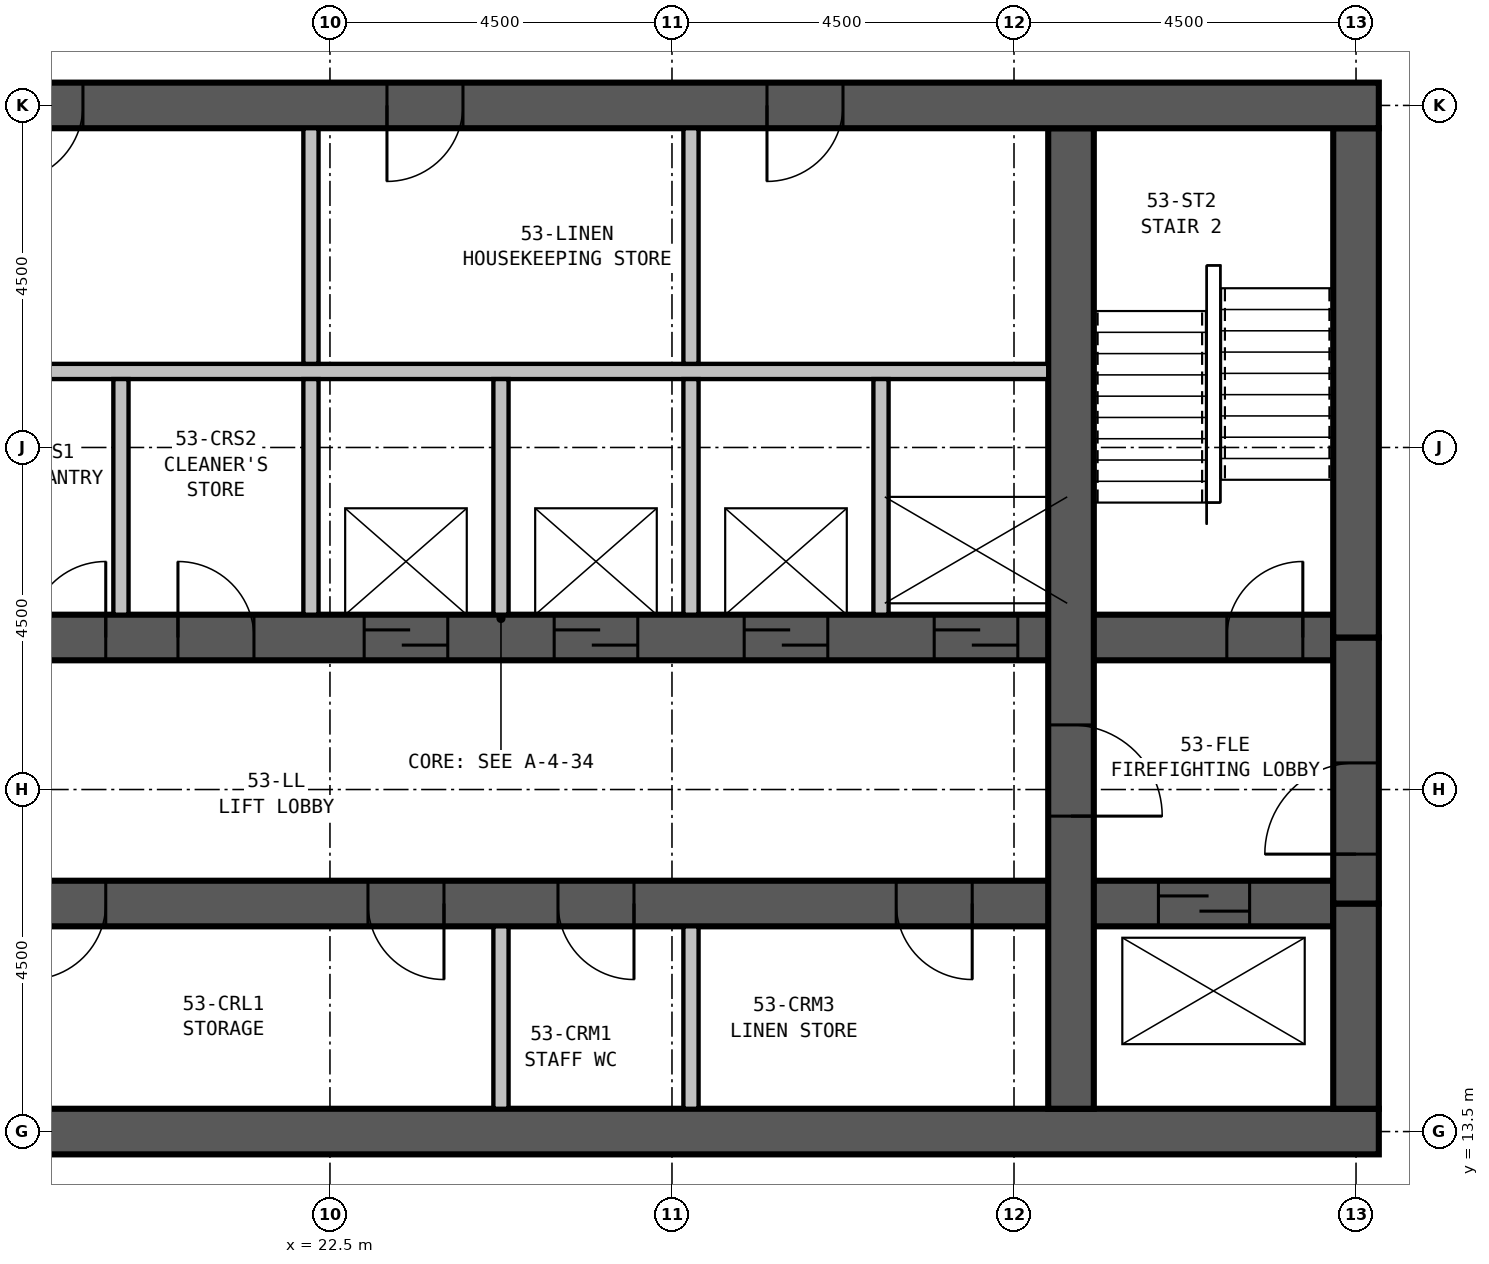
"""IFC4 building model, lengths in metres.
Left out: names, types, materials, properties, quantities, classifications, styles, units other than length and angle.
Written with IfcOpenShell. Run it as: python <this file> out.ifc"""

import sys

from ifc_helpers import new_model, si_unit, direction, frame, frame_2d, origin, place, context, subcontext, project, spatial, rectangle, extrude, element, fill, save


model = new_model("IFC4")
c1 = context("Model", 3, precision=1e-05, world=origin(), true_north=direction((0.0, 1.0)))
c2 = subcontext(c1, "Body", "Model", "MODEL_VIEW")
j1 = project(units=[si_unit("LENGTHUNIT", "METRE"), si_unit("PLANEANGLEUNIT", "RADIAN")], contexts=[c1])
p1 = place(None, origin())
s1 = spatial("IfcSite", under=j1, at=p1, CompositionType="ELEMENT")
p2 = place(p1, origin())
s2 = spatial("IfcBuilding", under=s1, at=p2, CompositionType="ELEMENT")
p3 = place(p2, frame((0.0, 0.0, 204.4)))
s3 = spatial("IfcBuildingStorey", under=s2, at=p3, CompositionType="ELEMENT", Elevation=204.4)
p4 = place(p3, frame((13.2, 13.5, 0.0), z_axis=(0.0, 0.0, 1.0), x_axis=(1.0, 0.0, 0.0)))
e1 = element("IfcWall", 1, at=p4, inside=s3, PredefinedType="SHEAR", context=c2, shape_type="SweptSolid", body=[
    extrude(rectangle(XDim=23.1, YDim=0.6, at=frame_2d((11.55, 0.0))), origin(), (0.0, 0.0, 1.0), 3.5),
])
p5 = place(p3, frame((36.3, 27.0, 0.0), z_axis=(0.0, 0.0, 1.0), x_axis=(-1.0, 0.0, 0.0)))
e2 = element("IfcWall", 2, at=p5, inside=s3, PredefinedType="SHEAR", context=c2, shape_type="SweptSolid", body=[
    extrude(rectangle(XDim=23.1, YDim=0.6, at=frame_2d((11.55, 0.0))), origin(), (0.0, 0.0, 1.0), 3.5),
])
p6 = place(p5, frame((17.05, 0.0, 0.0)))
e3 = element("IfcOpeningElement", 3, at=p6, cuts=e2, PredefinedType="OPENING", context=c2, shape_type="SweptSolid", body=[
    extrude(rectangle(XDim=1.0, YDim=2.1, at=frame_2d((0.5, 1.05))), frame((0.0, 0.31, 0.0), z_axis=(0.0, -1.0, 0.0), x_axis=(1.0, 0.0, 0.0)), (0.0, 0.0, 1.0), 0.62),
])
p7 = place(p5, frame((12.05, 0.0, 0.0)))
e4 = element("IfcOpeningElement", 4, at=p7, cuts=e2, PredefinedType="OPENING", context=c2, shape_type="SweptSolid", body=[
    extrude(rectangle(XDim=1.0, YDim=2.1, at=frame_2d((0.5, 1.05))), frame((0.0, 0.31, 0.0), z_axis=(0.0, -1.0, 0.0), x_axis=(1.0, 0.0, 0.0)), (0.0, 0.0, 1.0), 0.62),
])
p8 = place(p5, frame((7.05, 0.0, 0.0)))
e5 = element("IfcOpeningElement", 5, at=p8, cuts=e2, PredefinedType="OPENING", context=c2, shape_type="SweptSolid", body=[
    extrude(rectangle(XDim=1.0, YDim=2.1, at=frame_2d((0.5, 1.05))), frame((0.0, 0.31, 0.0), z_axis=(0.0, -1.0, 0.0), x_axis=(1.0, 0.0, 0.0)), (0.0, 0.0, 1.0), 0.62),
])
p9 = place(p3, frame((32.25, 13.8, 0.0), z_axis=(0.0, 0.0, 1.0), x_axis=(0.0, 1.0, 0.0)))
e6 = element("IfcWall", 6, at=p9, inside=s3, PredefinedType="SHEAR", context=c2, shape_type="SweptSolid", body=[
    extrude(rectangle(XDim=12.9, YDim=0.6, at=frame_2d((6.45, 0.0))), origin(), (0.0, 0.0, 1.0), 3.5),
])
p10 = place(p9, frame((5.05, 0.0, 0.0), z_axis=(0.0, 0.0, 1.0), x_axis=(-1.0, 0.0, 0.0)))
e7 = element("IfcOpeningElement", 7, at=p10, cuts=e6, PredefinedType="OPENING", context=c2, shape_type="SweptSolid", body=[
    extrude(rectangle(XDim=1.2, YDim=2.1, at=frame_2d((0.6, 1.05))), frame((0.0, 0.31, 0.0), z_axis=(0.0, -1.0, 0.0), x_axis=(1.0, 0.0, 0.0)), (0.0, 0.0, 1.0), 0.62),
])
p11 = place(p3, frame((13.8, 16.5, 0.0), z_axis=(0.0, 0.0, 1.0), x_axis=(1.0, 0.0, 0.0)))
e8 = element("IfcWall", 8, at=p11, inside=s3, PredefinedType="SHEAR", context=c2, shape_type="SweptSolid", body=[
    extrude(rectangle(XDim=21.9, YDim=0.6, at=frame_2d((10.95, 0.0))), origin(), (0.0, 0.0, 1.0), 3.5),
])
p12 = place(p11, frame((5.75, 0.0, 0.0), z_axis=(0.0, 0.0, 1.0), x_axis=(-1.0, 0.0, 0.0)))
e9 = element("IfcOpeningElement", 9, at=p12, cuts=e8, PredefinedType="OPENING", context=c2, shape_type="SweptSolid", body=[
    extrude(rectangle(XDim=1.0, YDim=2.1, at=frame_2d((0.5, 1.05))), frame((0.0, 0.31, 0.0), z_axis=(0.0, -1.0, 0.0), x_axis=(1.0, 0.0, 0.0)), (0.0, 0.0, 1.0), 0.62),
])
p13 = place(p11, frame((10.2, 0.0, 0.0), z_axis=(0.0, 0.0, 1.0), x_axis=(-1.0, 0.0, 0.0)))
e10 = element("IfcOpeningElement", 10, at=p13, cuts=e8, PredefinedType="OPENING", context=c2, shape_type="SweptSolid", body=[
    extrude(rectangle(XDim=1.0, YDim=2.1, at=frame_2d((0.5, 1.05))), frame((0.0, 0.31, 0.0), z_axis=(0.0, -1.0, 0.0), x_axis=(1.0, 0.0, 0.0)), (0.0, 0.0, 1.0), 0.62),
])
p14 = place(p11, frame((12.7, 0.0, 0.0), z_axis=(0.0, 0.0, 1.0), x_axis=(-1.0, 0.0, 0.0)))
e11 = element("IfcOpeningElement", 11, at=p14, cuts=e8, PredefinedType="OPENING", context=c2, shape_type="SweptSolid", body=[
    extrude(rectangle(XDim=1.0, YDim=2.1, at=frame_2d((0.5, 1.05))), frame((0.0, 0.31, 0.0), z_axis=(0.0, -1.0, 0.0), x_axis=(1.0, 0.0, 0.0)), (0.0, 0.0, 1.0), 0.62),
])
p15 = place(p11, frame((17.15, 0.0, 0.0), z_axis=(0.0, 0.0, 1.0), x_axis=(-1.0, 0.0, 0.0)))
e12 = element("IfcOpeningElement", 12, at=p15, cuts=e8, PredefinedType="OPENING", context=c2, shape_type="SweptSolid", body=[
    extrude(rectangle(XDim=1.0, YDim=2.1, at=frame_2d((0.5, 1.05))), frame((0.0, 0.31, 0.0), z_axis=(0.0, -1.0, 0.0), x_axis=(1.0, 0.0, 0.0)), (0.0, 0.0, 1.0), 0.62),
])
p16 = place(p11, frame((0.6, 0.0, 0.0)))
e13 = element("IfcOpeningElement", 13, at=p16, cuts=e8, PredefinedType="OPENING", context=c2, shape_type="SweptSolid", body=[
    extrude(rectangle(XDim=1.2, YDim=2.1, at=frame_2d((0.6, 1.05))), frame((0.0, 0.31, 0.0), z_axis=(0.0, -1.0, 0.0), x_axis=(1.0, 0.0, 0.0)), (0.0, 0.0, 1.0), 0.62),
])
p17 = place(p11, frame((19.6, 0.0, 0.0)))
e14 = element("IfcOpeningElement", 14, at=p17, cuts=e8, PredefinedType="OPENING", context=c2, shape_type="SweptSolid", body=[
    extrude(rectangle(XDim=1.2, YDim=2.1, at=frame_2d((0.6, 1.05))), frame((0.0, 0.31, 0.0), z_axis=(0.0, -1.0, 0.0), x_axis=(1.0, 0.0, 0.0)), (0.0, 0.0, 1.0), 0.62),
])
p18 = place(p3, frame((13.8, 20.0, 0.0), z_axis=(0.0, 0.0, 1.0), x_axis=(1.0, 0.0, 0.0)))
e15 = element("IfcWall", 15, at=p18, inside=s3, PredefinedType="SHEAR", context=c2, shape_type="SweptSolid", body=[
    extrude(rectangle(XDim=21.9, YDim=0.6, at=frame_2d((10.95, 0.0))), origin(), (0.0, 0.0, 1.0), 3.5),
])
p19 = place(p18, frame((0.5, 0.0, 0.0)))
e16 = element("IfcOpeningElement", 16, at=p19, cuts=e15, PredefinedType="OPENING", context=c2, shape_type="SweptSolid", body=[
    extrude(rectangle(XDim=1.0, YDim=2.1, at=frame_2d((0.5, 1.05))), frame((0.0, 0.31, 0.0), z_axis=(0.0, -1.0, 0.0), x_axis=(1.0, 0.0, 0.0)), (0.0, 0.0, 1.0), 0.62),
])
p20 = place(p18, frame((20.5, 0.0, 0.0)))
e17 = element("IfcOpeningElement", 17, at=p20, cuts=e15, PredefinedType="OPENING", context=c2, shape_type="SweptSolid", body=[
    extrude(rectangle(XDim=1.0, YDim=2.1, at=frame_2d((0.5, 1.05))), frame((0.0, 0.31, 0.0), z_axis=(0.0, -1.0, 0.0), x_axis=(1.0, 0.0, 0.0)), (0.0, 0.0, 1.0), 0.62),
])
p21 = place(p18, frame((9.15, 0.0, 0.0)))
e18 = element("IfcOpeningElement", 18, at=p21, cuts=e15, PredefinedType="OPENING", context=c2, shape_type="SweptSolid", body=[
    extrude(rectangle(XDim=1.1, YDim=2.1, at=frame_2d((0.55, 1.05))), frame((0.0, 0.31, 0.0), z_axis=(0.0, -1.0, 0.0), x_axis=(1.0, 0.0, 0.0)), (0.0, 0.0, 1.0), 0.62),
])
p22 = place(p18, frame((11.65, 0.0, 0.0)))
e19 = element("IfcOpeningElement", 19, at=p22, cuts=e15, PredefinedType="OPENING", context=c2, shape_type="SweptSolid", body=[
    extrude(rectangle(XDim=1.1, YDim=2.1, at=frame_2d((0.55, 1.05))), frame((0.0, 0.31, 0.0), z_axis=(0.0, -1.0, 0.0), x_axis=(1.0, 0.0, 0.0)), (0.0, 0.0, 1.0), 0.62),
])
p23 = place(p18, frame((14.15, 0.0, 0.0)))
e20 = element("IfcOpeningElement", 20, at=p23, cuts=e15, PredefinedType="OPENING", context=c2, shape_type="SweptSolid", body=[
    extrude(rectangle(XDim=1.1, YDim=2.1, at=frame_2d((0.55, 1.05))), frame((0.0, 0.31, 0.0), z_axis=(0.0, -1.0, 0.0), x_axis=(1.0, 0.0, 0.0)), (0.0, 0.0, 1.0), 0.62),
])
p24 = place(p18, frame((16.65, 0.0, 0.0)))
e21 = element("IfcOpeningElement", 21, at=p24, cuts=e15, PredefinedType="OPENING", context=c2, shape_type="SweptSolid", body=[
    extrude(rectangle(XDim=1.1, YDim=2.1, at=frame_2d((0.55, 1.05))), frame((0.0, 0.31, 0.0), z_axis=(0.0, -1.0, 0.0), x_axis=(1.0, 0.0, 0.0)), (0.0, 0.0, 1.0), 0.62),
])
p25 = place(p18, frame((4.75, 0.0, 0.0)))
e22 = element("IfcOpeningElement", 22, at=p25, cuts=e15, PredefinedType="OPENING", context=c2, shape_type="SweptSolid", body=[
    extrude(rectangle(XDim=1.0, YDim=2.1, at=frame_2d((0.5, 1.05))), frame((0.0, 0.31, 0.0), z_axis=(0.0, -1.0, 0.0), x_axis=(1.0, 0.0, 0.0)), (0.0, 0.0, 1.0), 0.62),
])
p26 = place(p18, frame((6.7, 0.0, 0.0)))
e23 = element("IfcOpeningElement", 23, at=p26, cuts=e15, PredefinedType="OPENING", context=c2, shape_type="SweptSolid", body=[
    extrude(rectangle(XDim=1.0, YDim=2.1, at=frame_2d((0.5, 1.05))), frame((0.0, 0.31, 0.0), z_axis=(0.0, -1.0, 0.0), x_axis=(1.0, 0.0, 0.0)), (0.0, 0.0, 1.0), 0.62),
])
p27 = place(p3, frame((36.0, 13.8, 0.0), z_axis=(0.0, 0.0, 1.0), x_axis=(0.0, 1.0, 0.0)))
e24 = element("IfcWall", 24, at=p27, inside=s3, PredefinedType="SHEAR", context=c2, shape_type="SweptSolid", body=[
    extrude(rectangle(XDim=2.7, YDim=0.6, at=frame_2d((1.35, 0.0))), origin(), (0.0, 0.0, 1.0), 3.5),
])
p28 = place(p3, frame((36.0, 16.5, 0.0), z_axis=(0.0, 0.0, 1.0), x_axis=(0.0, 1.0, 0.0)))
e25 = element("IfcWall", 25, at=p28, inside=s3, PredefinedType="SHEAR", context=c2, shape_type="SweptSolid", body=[
    extrude(rectangle(XDim=3.5, YDim=0.6, at=frame_2d((1.75, 0.0))), origin(), (0.0, 0.0, 1.0), 3.5),
])
p29 = place(p28, frame((0.65, 0.0, 0.0)))
e26 = element("IfcOpeningElement", 26, at=p29, cuts=e25, PredefinedType="OPENING", context=c2, shape_type="SweptSolid", body=[
    extrude(rectangle(XDim=1.2, YDim=2.1, at=frame_2d((0.6, 1.05))), frame((0.0, 0.31, 0.0), z_axis=(0.0, -1.0, 0.0), x_axis=(1.0, 0.0, 0.0)), (0.0, 0.0, 1.0), 0.62),
])
p30 = place(p3, frame((36.0, 20.0, 0.0), z_axis=(0.0, 0.0, 1.0), x_axis=(0.0, 1.0, 0.0)))
e27 = element("IfcWall", 27, at=p30, inside=s3, PredefinedType="SHEAR", context=c2, shape_type="SweptSolid", body=[
    extrude(rectangle(XDim=6.7, YDim=0.6, at=frame_2d((3.35, 0.0))), origin(), (0.0, 0.0, 1.0), 3.5),
])
for number, where, z_axis, x_axis in (
    (28, (19.75, 20.3, 0.0), (0.0, 0.0, 1.0), (0.0, 1.0, 0.0)),
    (29, (22.25, 20.3, 0.0), (0.0, 0.0, 1.0), (0.0, 1.0, 0.0)),
):
    element("IfcWall", number, at=place(p3, frame(where, z_axis=z_axis, x_axis=x_axis)), inside=s3, PredefinedType="PARTITIONING", context=c2, shape_type="SweptSolid", body=[
        extrude(rectangle(XDim=3.1, YDim=0.2, at=frame_2d((1.55, 0.0))), origin(), (0.0, 0.0, 1.0), 3.25),
    ])
p31 = place(p3, frame((24.75, 13.8, 0.0), z_axis=(0.0, 0.0, 1.0), x_axis=(0.0, 1.0, 0.0)))
e30 = element("IfcWall", 30, at=p31, inside=s3, PredefinedType="PARTITIONING", context=c2, shape_type="SweptSolid", body=[
    extrude(rectangle(XDim=2.4, YDim=0.2, at=frame_2d((1.2, 0.0))), origin(), (0.0, 0.0, 1.0), 3.25),
])
p32 = place(p3, frame((24.75, 20.3, 0.0), z_axis=(0.0, 0.0, 1.0), x_axis=(0.0, 1.0, 0.0)))
e31 = element("IfcWall", 31, at=p32, inside=s3, PredefinedType="PARTITIONING", context=c2, shape_type="SweptSolid", body=[
    extrude(rectangle(XDim=3.1, YDim=0.2, at=frame_2d((1.55, 0.0))), origin(), (0.0, 0.0, 1.0), 3.25),
])
p33 = place(p3, frame((27.25, 13.8, 0.0), z_axis=(0.0, 0.0, 1.0), x_axis=(0.0, 1.0, 0.0)))
e32 = element("IfcWall", 32, at=p33, inside=s3, PredefinedType="PARTITIONING", context=c2, shape_type="SweptSolid", body=[
    extrude(rectangle(XDim=2.4, YDim=0.2, at=frame_2d((1.2, 0.0))), origin(), (0.0, 0.0, 1.0), 3.25),
])
for number, where, z_axis, x_axis in (
    (33, (27.25, 20.3, 0.0), (0.0, 0.0, 1.0), (0.0, 1.0, 0.0)),
    (34, (29.75, 20.3, 0.0), (0.0, 0.0, 1.0), (0.0, 1.0, 0.0)),
):
    element("IfcWall", number, at=place(p3, frame(where, z_axis=z_axis, x_axis=x_axis)), inside=s3, PredefinedType="PARTITIONING", context=c2, shape_type="SweptSolid", body=[
        extrude(rectangle(XDim=3.1, YDim=0.2, at=frame_2d((1.55, 0.0))), origin(), (0.0, 0.0, 1.0), 3.25),
    ])
p34 = place(p3, frame((17.55, 23.5, 0.0), z_axis=(0.0, 0.0, 1.0), x_axis=(1.0, 0.0, 0.0)))
e35 = element("IfcWall", 35, at=p34, inside=s3, PredefinedType="PARTITIONING", context=c2, shape_type="SweptSolid", body=[
    extrude(rectangle(XDim=14.4, YDim=0.2, at=frame_2d((7.2, 0.0))), origin(), (0.0, 0.0, 1.0), 3.25),
])
for number, where, z_axis, x_axis in (
    (36, (22.25, 23.6, 0.0), (0.0, 0.0, 1.0), (0.0, 1.0, 0.0)),
    (37, (27.25, 23.6, 0.0), (0.0, 0.0, 1.0), (0.0, 1.0, 0.0)),
):
    element("IfcWall", number, at=place(p3, frame(where, z_axis=z_axis, x_axis=x_axis)), inside=s3, PredefinedType="PARTITIONING", context=c2, shape_type="SweptSolid", body=[
        extrude(rectangle(XDim=3.1, YDim=0.2, at=frame_2d((1.55, 0.0))), origin(), (0.0, 0.0, 1.0), 3.25),
    ])
p35 = place(p29, origin())
e38 = element("IfcDoor", 38, at=p35, inside=s3, OperationType="SINGLE_SWING_LEFT", PredefinedType="DOOR", context=c2, shape_type="SweptSolid", body=[
    extrude(rectangle(XDim=1.2, YDim=2.1, at=frame_2d((0.6, 1.05))), frame((0.0, 0.3, 0.0), z_axis=(0.0, -1.0, 0.0), x_axis=(1.0, 0.0, 0.0)), (0.0, 0.0, 1.0), 0.6),
])
fill(e26, e38)
p36 = place(p10, origin())
e39 = element("IfcDoor", 39, at=p36, inside=s3, OperationType="SINGLE_SWING_RIGHT", PredefinedType="DOOR", context=c2, shape_type="SweptSolid", body=[
    extrude(rectangle(XDim=1.2, YDim=2.1, at=frame_2d((0.6, 1.05))), frame((0.0, 0.3, 0.0), z_axis=(0.0, -1.0, 0.0), x_axis=(1.0, 0.0, 0.0)), (0.0, 0.0, 1.0), 0.6),
])
fill(e7, e39)
p37 = place(p20, origin())
e40 = element("IfcDoor", 40, at=p37, inside=s3, OperationType="SINGLE_SWING_RIGHT", PredefinedType="DOOR", context=c2, shape_type="SweptSolid", body=[
    extrude(rectangle(XDim=1.0, YDim=2.1, at=frame_2d((0.5, 1.05))), frame((0.0, 0.3, 0.0), z_axis=(0.0, -1.0, 0.0), x_axis=(1.0, 0.0, 0.0)), (0.0, 0.0, 1.0), 0.6),
])
fill(e17, e40)
p38 = place(p21, origin())
e41 = element("IfcDoor", 41, at=p38, inside=s3, OperationType="SLIDING_TO_LEFT", PredefinedType="DOOR", context=c2, shape_type="SweptSolid", body=[
    extrude(rectangle(XDim=1.1, YDim=2.1, at=frame_2d((0.55, 1.05))), frame((0.0, 0.3, 0.0), z_axis=(0.0, -1.0, 0.0), x_axis=(1.0, 0.0, 0.0)), (0.0, 0.0, 1.0), 0.6),
])
fill(e18, e41)
p39 = place(p22, origin())
e42 = element("IfcDoor", 42, at=p39, inside=s3, OperationType="SLIDING_TO_LEFT", PredefinedType="DOOR", context=c2, shape_type="SweptSolid", body=[
    extrude(rectangle(XDim=1.1, YDim=2.1, at=frame_2d((0.55, 1.05))), frame((0.0, 0.3, 0.0), z_axis=(0.0, -1.0, 0.0), x_axis=(1.0, 0.0, 0.0)), (0.0, 0.0, 1.0), 0.6),
])
fill(e19, e42)
p40 = place(p23, origin())
e43 = element("IfcDoor", 43, at=p40, inside=s3, OperationType="SLIDING_TO_LEFT", PredefinedType="DOOR", context=c2, shape_type="SweptSolid", body=[
    extrude(rectangle(XDim=1.1, YDim=2.1, at=frame_2d((0.55, 1.05))), frame((0.0, 0.3, 0.0), z_axis=(0.0, -1.0, 0.0), x_axis=(1.0, 0.0, 0.0)), (0.0, 0.0, 1.0), 0.6),
])
fill(e20, e43)
p41 = place(p24, origin())
e44 = element("IfcDoor", 44, at=p41, inside=s3, OperationType="SLIDING_TO_LEFT", PredefinedType="DOOR", context=c2, shape_type="SweptSolid", body=[
    extrude(rectangle(XDim=1.1, YDim=2.1, at=frame_2d((0.55, 1.05))), frame((0.0, 0.3, 0.0), z_axis=(0.0, -1.0, 0.0), x_axis=(1.0, 0.0, 0.0)), (0.0, 0.0, 1.0), 0.6),
])
fill(e21, e44)
p42 = place(p12, origin())
e45 = element("IfcDoor", 45, at=p42, inside=s3, OperationType="SINGLE_SWING_RIGHT", PredefinedType="DOOR", context=c2, shape_type="SweptSolid", body=[
    extrude(rectangle(XDim=1.0, YDim=2.1, at=frame_2d((0.5, 1.05))), frame((0.0, 0.3, 0.0), z_axis=(0.0, -1.0, 0.0), x_axis=(1.0, 0.0, 0.0)), (0.0, 0.0, 1.0), 0.6),
])
fill(e9, e45)
p43 = place(p13, origin())
e46 = element("IfcDoor", 46, at=p43, inside=s3, OperationType="SINGLE_SWING_LEFT", PredefinedType="DOOR", context=c2, shape_type="SweptSolid", body=[
    extrude(rectangle(XDim=1.0, YDim=2.1, at=frame_2d((0.5, 1.05))), frame((0.0, 0.3, 0.0), z_axis=(0.0, -1.0, 0.0), x_axis=(1.0, 0.0, 0.0)), (0.0, 0.0, 1.0), 0.6),
])
fill(e10, e46)
p44 = place(p14, origin())
e47 = element("IfcDoor", 47, at=p44, inside=s3, OperationType="SINGLE_SWING_LEFT", PredefinedType="DOOR", context=c2, shape_type="SweptSolid", body=[
    extrude(rectangle(XDim=1.0, YDim=2.1, at=frame_2d((0.5, 1.05))), frame((0.0, 0.3, 0.0), z_axis=(0.0, -1.0, 0.0), x_axis=(1.0, 0.0, 0.0)), (0.0, 0.0, 1.0), 0.6),
])
fill(e11, e47)
p45 = place(p15, origin())
e48 = element("IfcDoor", 48, at=p45, inside=s3, OperationType="SINGLE_SWING_LEFT", PredefinedType="DOOR", context=c2, shape_type="SweptSolid", body=[
    extrude(rectangle(XDim=1.0, YDim=2.1, at=frame_2d((0.5, 1.05))), frame((0.0, 0.3, 0.0), z_axis=(0.0, -1.0, 0.0), x_axis=(1.0, 0.0, 0.0)), (0.0, 0.0, 1.0), 0.6),
])
fill(e12, e48)
p46 = place(p25, origin())
e49 = element("IfcDoor", 49, at=p46, inside=s3, OperationType="SINGLE_SWING_RIGHT", PredefinedType="DOOR", context=c2, shape_type="SweptSolid", body=[
    extrude(rectangle(XDim=1.0, YDim=2.1, at=frame_2d((0.5, 1.05))), frame((0.0, 0.3, 0.0), z_axis=(0.0, -1.0, 0.0), x_axis=(1.0, 0.0, 0.0)), (0.0, 0.0, 1.0), 0.6),
])
fill(e22, e49)
p47 = place(p26, origin())
e50 = element("IfcDoor", 50, at=p47, inside=s3, OperationType="SINGLE_SWING_LEFT", PredefinedType="DOOR", context=c2, shape_type="SweptSolid", body=[
    extrude(rectangle(XDim=1.0, YDim=2.1, at=frame_2d((0.5, 1.05))), frame((0.0, 0.3, 0.0), z_axis=(0.0, -1.0, 0.0), x_axis=(1.0, 0.0, 0.0)), (0.0, 0.0, 1.0), 0.6),
])
fill(e23, e50)
p48 = place(p17, origin())
e51 = element("IfcDoor", 51, at=p48, inside=s3, OperationType="SLIDING_TO_LEFT", PredefinedType="DOOR", context=c2, shape_type="SweptSolid", body=[
    extrude(rectangle(XDim=1.2, YDim=2.1, at=frame_2d((0.6, 1.05))), frame((0.0, 0.3, 0.0), z_axis=(0.0, -1.0, 0.0), x_axis=(1.0, 0.0, 0.0)), (0.0, 0.0, 1.0), 0.6),
])
fill(e14, e51)
p49 = place(p6, origin())
e52 = element("IfcDoor", 52, at=p49, inside=s3, OperationType="SINGLE_SWING_RIGHT", PredefinedType="DOOR", context=c2, shape_type="SweptSolid", body=[
    extrude(rectangle(XDim=1.0, YDim=2.1, at=frame_2d((0.5, 1.05))), frame((0.0, 0.3, 0.0), z_axis=(0.0, -1.0, 0.0), x_axis=(1.0, 0.0, 0.0)), (0.0, 0.0, 1.0), 0.6),
])
fill(e3, e52)
p50 = place(p7, origin())
e53 = element("IfcDoor", 53, at=p50, inside=s3, OperationType="SINGLE_SWING_RIGHT", PredefinedType="DOOR", context=c2, shape_type="SweptSolid", body=[
    extrude(rectangle(XDim=1.0, YDim=2.1, at=frame_2d((0.5, 1.05))), frame((0.0, 0.3, 0.0), z_axis=(0.0, -1.0, 0.0), x_axis=(1.0, 0.0, 0.0)), (0.0, 0.0, 1.0), 0.6),
])
fill(e4, e53)
p51 = place(p8, origin())
e54 = element("IfcDoor", 54, at=p51, inside=s3, OperationType="SINGLE_SWING_RIGHT", PredefinedType="DOOR", context=c2, shape_type="SweptSolid", body=[
    extrude(rectangle(XDim=1.0, YDim=2.1, at=frame_2d((0.5, 1.05))), frame((0.0, 0.3, 0.0), z_axis=(0.0, -1.0, 0.0), x_axis=(1.0, 0.0, 0.0)), (0.0, 0.0, 1.0), 0.6),
])
fill(e5, e54)
save(model, sys.argv[1])
